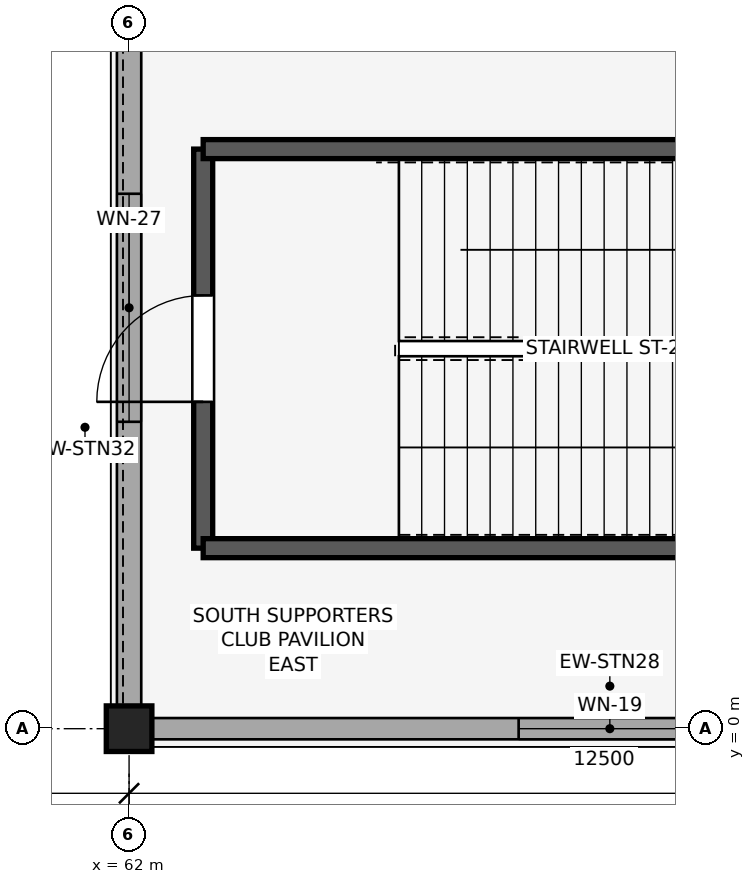
"""IFC4 building model, lengths in metres.
Left out: names, types, materials, properties, quantities, classifications, styles, units other than length and angle.
Written with IfcOpenShell. Run it as: python <this file> out.ifc"""

import sys

from ifc_helpers import new_model, si_unit, direction, frame, frame_2d, origin, origin_2d, place, context, subcontext, project, spatial, rectangle, extrude, element, fill, save


model = new_model("IFC4")
c1 = context("Model", 3, precision=1e-05, world=origin(), true_north=direction((0.0, 1.0)))
c2 = subcontext(c1, "Body", "Model", "MODEL_VIEW")
j1 = project(units=[si_unit("LENGTHUNIT", "METRE"), si_unit("PLANEANGLEUNIT", "RADIAN")], contexts=[c1])
p1 = place(None, origin())
s1 = spatial("IfcSite", under=j1, at=p1, CompositionType="ELEMENT")
p2 = place(p1, origin())
s2 = spatial("IfcBuilding", under=s1, at=p2, CompositionType="ELEMENT")
p3 = place(p2, frame((0.0, 0.0, 5.4)))
s3 = spatial("IfcBuildingStorey", under=s2, at=p3, CompositionType="ELEMENT", Elevation=5.4)
p4 = place(p3, frame((62.0, 0.0, 0.0), z_axis=(0.0, 0.0, 1.0), x_axis=(1.0, 0.0, 0.0)))
e1 = element("IfcColumn", 1, at=p4, inside=s3, PredefinedType="COLUMN", context=c2, shape_type="SweptSolid", body=[
    extrude(rectangle(XDim=0.6, YDim=0.6, at=origin_2d()), origin(), (0.0, 0.0, 1.0), 5.2),
])
p5 = place(p3, frame((62.297, 0.0, 0.0), z_axis=(0.0, 0.0, 1.0), x_axis=(1.0, 0.0, 0.0)))
e2 = element("IfcWall", 2, at=p5, inside=s3, PredefinedType="STANDARD", context=c2, shape_type="SweptSolid", body=[
    extrude(rectangle(XDim=12.056, YDim=0.28, at=frame_2d((6.028, 0.0))), origin(), (0.0, 0.0, 1.0), 4.3),
])
p6 = place(p5, frame((4.828, 0.0, 0.95)))
e3 = element("IfcOpeningElement", 3, at=p6, cuts=e2, PredefinedType="OPENING", context=c2, shape_type="SweptSolid", body=[
    extrude(rectangle(XDim=2.4, YDim=1.85, at=frame_2d((1.2, 0.925))), frame((0.0, 0.15, 0.0), z_axis=(0.0, -1.0, 0.0), x_axis=(1.0, 0.0, 0.0)), (0.0, 0.0, 1.0), 0.3),
])
p7 = place(p3, frame((62.0, 0.297, 0.0), z_axis=(0.0, 0.0, 1.0), x_axis=(0.0, 1.0, 0.0)))
e4 = element("IfcWall", 4, at=p7, inside=s3, PredefinedType="STANDARD", context=c2, shape_type="SweptSolid", body=[
    extrude(rectangle(XDim=10.481, YDim=0.32, at=frame_2d((5.24, 0.0))), origin(), (0.0, 0.0, 1.0), 4.3),
])
p8 = place(p7, frame((3.74, 0.0, 0.95)))
e5 = element("IfcOpeningElement", 5, at=p8, cuts=e4, PredefinedType="OPENING", context=c2, shape_type="SweptSolid", body=[
    extrude(rectangle(XDim=3.0, YDim=1.85, at=frame_2d((1.5, 0.925))), frame((0.0, 0.17, 0.0), z_axis=(0.0, -1.0, 0.0), x_axis=(1.0, 0.0, 0.0)), (0.0, 0.0, 1.0), 0.34),
])
p9 = place(p3, frame((62.975, 7.625, 0.0), z_axis=(0.0, 0.0, 1.0), x_axis=(0.0, -1.0, 0.0)))
e6 = element("IfcWall", 6, at=p9, inside=s3, PredefinedType="SHEAR", context=c2, shape_type="SweptSolid", body=[
    extrude(rectangle(XDim=5.25, YDim=0.25, at=frame_2d((2.625, 0.0))), origin(), (0.0, 0.0, 1.0), 4.92),
])
p10 = place(p9, frame((1.925, 0.0, 0.0)))
e7 = element("IfcOpeningElement", 7, at=p10, cuts=e6, PredefinedType="OPENING", context=c2, shape_type="SweptSolid", body=[
    extrude(rectangle(XDim=1.4, YDim=2.2, at=frame_2d((0.7, 1.1))), frame((0.0, 0.135, 0.0), z_axis=(0.0, -1.0, 0.0), x_axis=(1.0, 0.0, 0.0)), (0.0, 0.0, 1.0), 0.27),
])
for number, where, z_axis, x_axis in (
    (8, (62.975, 2.375, 0.0), (0.0, 0.0, 1.0), (1.0, 0.0, 0.0)),
    (9, (73.425, 7.625, 0.0), (0.0, 0.0, 1.0), (-1.0, 0.0, 0.0)),
):
    element("IfcWall", number, at=place(p3, frame(where, z_axis=z_axis, x_axis=x_axis)), inside=s3, PredefinedType="SHEAR", context=c2, shape_type="SweptSolid", body=[
        extrude(rectangle(XDim=10.45, YDim=0.25, at=frame_2d((5.225, 0.0))), origin(), (0.0, 0.0, 1.0), 4.92),
    ])
p11 = place(p6, origin())
e10 = element("IfcWindow", 10, at=p11, inside=s3, PartitioningType="SINGLE_PANEL", PredefinedType="WINDOW", context=c2, shape_type="SweptSolid", body=[
    extrude(rectangle(XDim=2.4, YDim=1.85, at=frame_2d((1.2, 0.925))), frame((0.0, 0.03, 0.0), z_axis=(0.0, -1.0, 0.0), x_axis=(1.0, 0.0, 0.0)), (0.0, 0.0, 1.0), 0.06),
])
fill(e3, e10)
p12 = place(p8, origin())
e11 = element("IfcWindow", 11, at=p12, inside=s3, PartitioningType="SINGLE_PANEL", PredefinedType="WINDOW", context=c2, shape_type="SweptSolid", body=[
    extrude(rectangle(XDim=3.0, YDim=1.85, at=frame_2d((1.5, 0.925))), frame((0.0, 0.03, 0.0), z_axis=(0.0, -1.0, 0.0), x_axis=(1.0, 0.0, 0.0)), (0.0, 0.0, 1.0), 0.06),
])
fill(e5, e11)
p13 = place(p10, frame((1.4, 0.0, 0.0), z_axis=(0.0, 0.0, 1.0), x_axis=(-1.0, 0.0, 0.0)))
e12 = element("IfcDoor", 12, at=p13, inside=s3, OperationType="SINGLE_SWING_LEFT", PredefinedType="DOOR", context=c2, shape_type="SweptSolid", body=[
    extrude(rectangle(XDim=1.4, YDim=2.2, at=frame_2d((0.7, 1.1))), frame((0.0, 0.025, 0.0), z_axis=(0.0, -1.0, 0.0), x_axis=(1.0, 0.0, 0.0)), (0.0, 0.0, 1.0), 0.05),
])
fill(e7, e12)
save(model, sys.argv[1])
